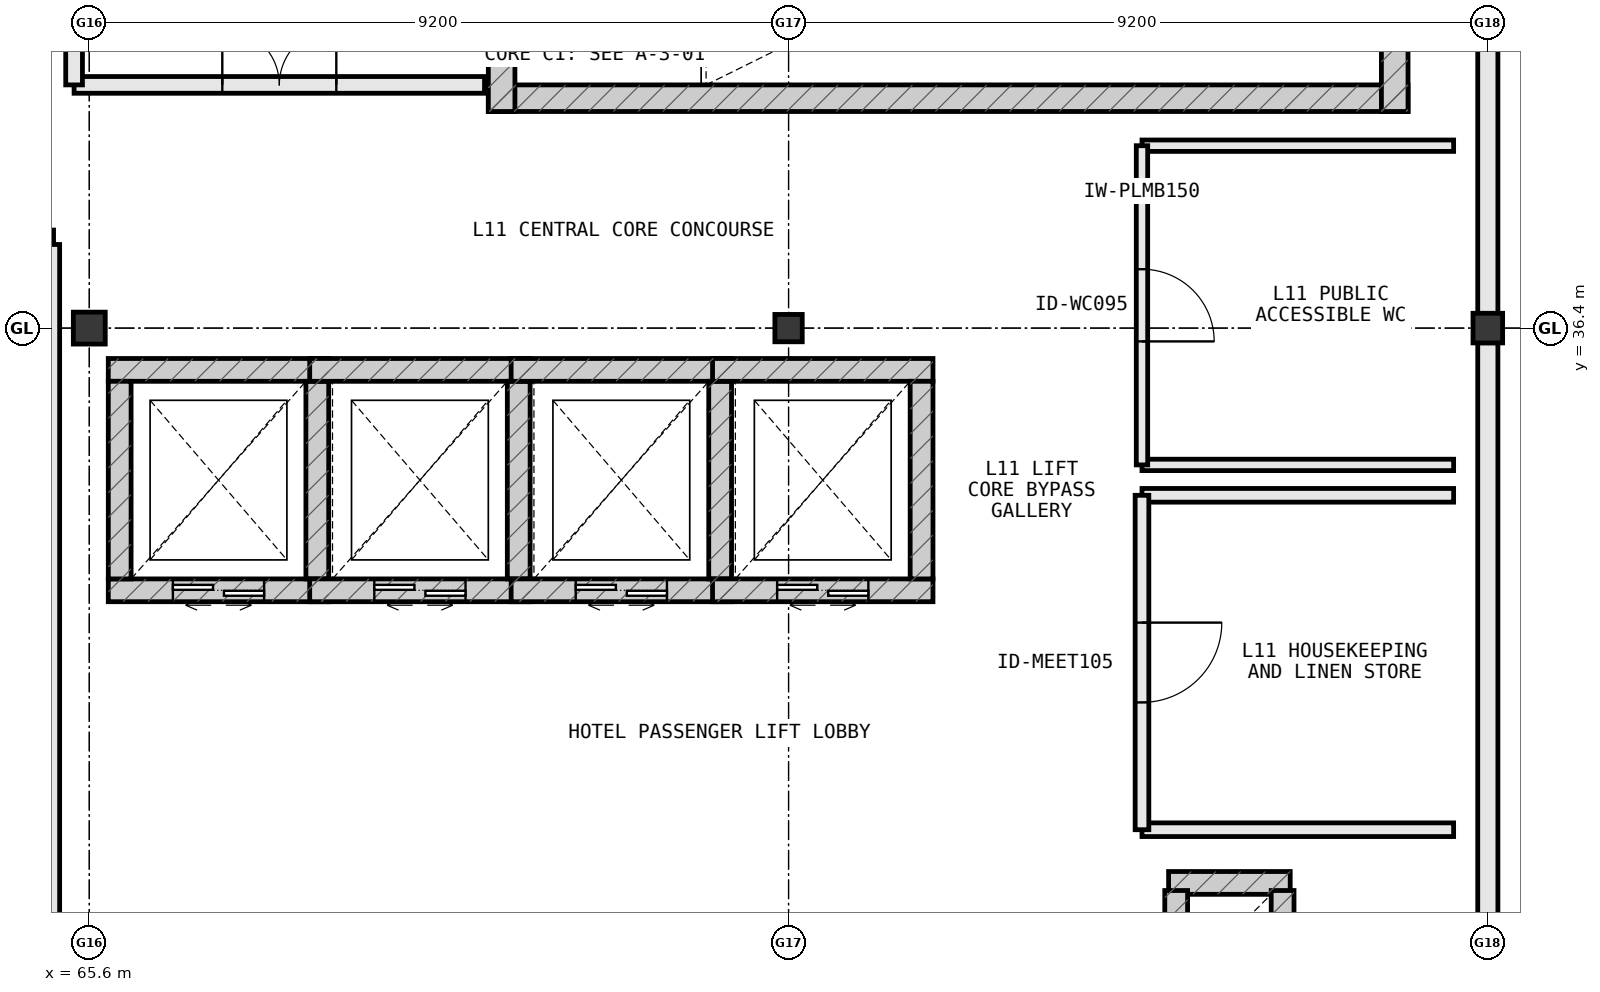
"""IFC4 building model, lengths in metres.
Left out: names, types, materials, properties, quantities, classifications, styles, units other than length and angle.
Written with IfcOpenShell. Run it as: python <this file> out.ifc"""

import sys

from ifc_helpers import new_model, si_unit, direction, frame, frame_2d, origin, origin_2d, place, context, subcontext, project, spatial, rectangle, extrude, element, fill, save


model = new_model("IFC4")
c1 = context("Model", 3, precision=1e-05, world=origin(), true_north=direction((0.0, 1.0)))
c2 = subcontext(c1, "Body", "Model", "MODEL_VIEW")
j1 = project(units=[si_unit("LENGTHUNIT", "METRE"), si_unit("PLANEANGLEUNIT", "RADIAN")], contexts=[c1])
p1 = place(None, origin())
s1 = spatial("IfcSite", under=j1, at=p1, CompositionType="ELEMENT")
p2 = place(p1, origin())
s2 = spatial("IfcBuilding", under=s1, at=p2, CompositionType="ELEMENT")
p3 = place(p2, frame((0.0, 0.0, 46.6)))
s3 = spatial("IfcBuildingStorey", under=s2, at=p3, CompositionType="ELEMENT", Elevation=46.6)
p4 = place(p3, frame((74.8, 36.4, 0.0), z_axis=(0.0, 0.0, 1.0), x_axis=(1.0, 0.0, 0.0)))
e1 = element("IfcColumn", 1, at=p4, inside=s3, PredefinedType="COLUMN", context=c2, shape_type="SweptSolid", body=[
    extrude(rectangle(XDim=0.36, YDim=0.36, at=origin_2d()), origin(), (0.0, 0.0, 1.0), 4.2),
])
p5 = place(p3, frame((84.0, 36.4, 0.0), z_axis=(0.0, 0.0, 1.0), x_axis=(1.0, 0.0, 0.0)))
e2 = element("IfcColumn", 2, at=p5, inside=s3, PredefinedType="COLUMN", context=c2, shape_type="SweptSolid", body=[
    extrude(rectangle(XDim=0.39, YDim=0.39, at=origin_2d()), origin(), (0.0, 0.0, 1.0), 4.2),
])
p6 = place(p3, frame((65.6, 36.4, 0.0), z_axis=(0.0, 0.0, 1.0), x_axis=(1.0, 0.0, 0.0)))
e3 = element("IfcColumn", 3, at=p6, inside=s3, PredefinedType="COLUMN", context=c2, shape_type="SweptSolid", body=[
    extrude(rectangle(XDim=0.42, YDim=0.42, at=origin_2d()), origin(), (0.0, 0.0, 1.0), 4.2),
])
p7 = place(p3, frame((81.4, 29.1, 0.0), z_axis=(0.0, 0.0, 1.0), x_axis=(-1.0, 0.0, 0.0)))
e4 = element("IfcWall", 4, at=p7, inside=s3, PredefinedType="SHEAR", context=c2, shape_type="SweptSolid", body=[
    extrude(rectangle(XDim=1.6, YDim=0.3, at=frame_2d((0.8, 0.0))), origin(), (0.0, 0.0, 1.0), 3.99),
])
for number, where, z_axis, x_axis in (
    (5, (79.9, 29.0, 0.0), (0.0, 0.0, 1.0), (0.0, -1.0, 0.0)),
    (6, (81.3, 27.8, 0.0), (0.0, 0.0, 1.0), (0.0, 1.0, 0.0)),
):
    element("IfcWall", number, at=place(p3, frame(where, z_axis=z_axis, x_axis=x_axis)), inside=s3, PredefinedType="SHEAR", context=c2, shape_type="SweptSolid", body=[
        extrude(rectangle(XDim=1.2, YDim=0.3, at=frame_2d((0.6, 0.0))), origin(), (0.0, 0.0, 1.0), 3.99),
    ])
p8 = place(p3, frame((84.0, 27.193, 0.0), z_axis=(0.0, 0.0, 1.0), x_axis=(0.0, 1.0, 0.0)))
e7 = element("IfcWall", 7, at=p8, inside=s3, PredefinedType="STANDARD", context=c2, shape_type="SweptSolid", body=[
    extrude(rectangle(XDim=9.014, YDim=0.265, at=frame_2d((4.507, 0.0))), origin(), (0.0, 0.0, 1.0), 3.99),
])
p9 = place(p3, frame((84.0, 36.593, 0.0), z_axis=(0.0, 0.0, 1.0), x_axis=(0.0, 1.0, 0.0)))
e8 = element("IfcWall", 8, at=p9, inside=s3, PredefinedType="STANDARD", context=c2, shape_type="SweptSolid", body=[
    extrude(rectangle(XDim=10.414, YDim=0.265, at=frame_2d((5.207, 0.0))), origin(), (0.0, 0.0, 1.0), 3.99),
])
p10 = place(p9, frame((7.135, 0.0, 0.85)))
e9 = element("IfcOpeningElement", 9, at=p10, cuts=e8, PredefinedType="OPENING", context=c2, shape_type="SweptSolid", body=[
    extrude(rectangle(XDim=1.35, YDim=1.65, at=frame_2d((0.675, 0.825))), frame((0.0, 0.145, 0.0), z_axis=(0.0, -1.0, 0.0), x_axis=(1.0, 0.0, 0.0)), (0.0, 0.0, 1.0), 0.289),
])
p11 = place(p3, frame((70.85, 39.425, 0.0), z_axis=(0.0, 0.0, 1.0), x_axis=(1.0, 0.0, 0.0)))
e10 = element("IfcWall", 10, at=p11, inside=s3, PredefinedType="SHEAR", context=c2, shape_type="SweptSolid", body=[
    extrude(rectangle(XDim=12.1, YDim=0.35, at=frame_2d((6.05, 0.0))), origin(), (0.0, 0.0, 1.0), 3.99),
])
p12 = place(p3, frame((82.775, 39.25, 0.0), z_axis=(0.0, 0.0, 1.0), x_axis=(0.0, 1.0, 0.0)))
e11 = element("IfcWall", 11, at=p12, inside=s3, PredefinedType="SHEAR", context=c2, shape_type="SweptSolid", body=[
    extrude(rectangle(XDim=5.1, YDim=0.35, at=frame_2d((2.55, 0.0))), origin(), (0.0, 0.0, 1.0), 3.99),
])
p13 = place(p3, frame((71.025, 44.35, 0.0), z_axis=(0.0, 0.0, 1.0), x_axis=(0.0, -1.0, 0.0)))
e12 = element("IfcWall", 12, at=p13, inside=s3, PredefinedType="SHEAR", context=c2, shape_type="SweptSolid", body=[
    extrude(rectangle(XDim=5.1, YDim=0.35, at=frame_2d((2.55, 0.0))), origin(), (0.0, 0.0, 1.0), 3.99),
])
p14 = place(p13, frame((2.0, 0.0, 0.0)))
e13 = element("IfcOpeningElement", 13, at=p14, cuts=e12, PredefinedType="OPENING", context=c2, shape_type="SweptSolid", body=[
    extrude(rectangle(XDim=1.1, YDim=2.2, at=frame_2d((0.55, 1.1))), frame((0.0, 0.187, 0.0), z_axis=(0.0, -1.0, 0.0), x_axis=(1.0, 0.0, 0.0)), (0.0, 0.0, 1.0), 0.374),
])
p15 = place(p3, frame((65.85, 32.95, 0.0), z_axis=(0.0, 0.0, 1.0), x_axis=(1.0, 0.0, 0.0)))
e14 = element("IfcWall", 14, at=p15, inside=s3, PredefinedType="SHEAR", context=c2, shape_type="SweptSolid", body=[
    extrude(rectangle(XDim=2.9, YDim=0.3, at=frame_2d((1.45, 0.0))), origin(), (0.0, 0.0, 1.0), 3.99),
])
p16 = place(p15, frame((0.85, 0.0, 0.0)))
e15 = element("IfcOpeningElement", 15, at=p16, cuts=e14, PredefinedType="OPENING", context=c2, shape_type="SweptSolid", body=[
    extrude(rectangle(XDim=1.2, YDim=2.2, at=frame_2d((0.6, 1.1))), frame((0.0, 0.162, 0.0), z_axis=(0.0, -1.0, 0.0), x_axis=(1.0, 0.0, 0.0)), (0.0, 0.0, 1.0), 0.324),
])
p17 = place(p3, frame((68.75, 35.85, 0.0), z_axis=(0.0, 0.0, 1.0), x_axis=(-1.0, 0.0, 0.0)))
e16 = element("IfcWall", 16, at=p17, inside=s3, PredefinedType="SHEAR", context=c2, shape_type="SweptSolid", body=[
    extrude(rectangle(XDim=2.9, YDim=0.3, at=frame_2d((1.45, 0.0))), origin(), (0.0, 0.0, 1.0), 3.99),
])
for number, where, z_axis, x_axis in (
    (17, (68.6, 33.1, 0.0), (0.0, 0.0, 1.0), (0.0, 1.0, 0.0)),
    (18, (66.0, 35.7, 0.0), (0.0, 0.0, 1.0), (0.0, -1.0, 0.0)),
):
    element("IfcWall", number, at=place(p3, frame(where, z_axis=z_axis, x_axis=x_axis)), inside=s3, PredefinedType="SHEAR", context=c2, shape_type="SweptSolid", body=[
        extrude(rectangle(XDim=2.6, YDim=0.3, at=frame_2d((1.3, 0.0))), origin(), (0.0, 0.0, 1.0), 3.99),
    ])
p18 = place(p3, frame((68.5, 32.95, 0.0), z_axis=(0.0, 0.0, 1.0), x_axis=(1.0, 0.0, 0.0)))
e19 = element("IfcWall", 19, at=p18, inside=s3, PredefinedType="SHEAR", context=c2, shape_type="SweptSolid", body=[
    extrude(rectangle(XDim=2.9, YDim=0.3, at=frame_2d((1.45, 0.0))), origin(), (0.0, 0.0, 1.0), 3.99),
])
p19 = place(p18, frame((0.85, 0.0, 0.0)))
e20 = element("IfcOpeningElement", 20, at=p19, cuts=e19, PredefinedType="OPENING", context=c2, shape_type="SweptSolid", body=[
    extrude(rectangle(XDim=1.2, YDim=2.2, at=frame_2d((0.6, 1.1))), frame((0.0, 0.162, 0.0), z_axis=(0.0, -1.0, 0.0), x_axis=(1.0, 0.0, 0.0)), (0.0, 0.0, 1.0), 0.324),
])
p20 = place(p3, frame((71.4, 35.85, 0.0), z_axis=(0.0, 0.0, 1.0), x_axis=(-1.0, 0.0, 0.0)))
e21 = element("IfcWall", 21, at=p20, inside=s3, PredefinedType="SHEAR", context=c2, shape_type="SweptSolid", body=[
    extrude(rectangle(XDim=2.9, YDim=0.3, at=frame_2d((1.45, 0.0))), origin(), (0.0, 0.0, 1.0), 3.99),
])
p21 = place(p3, frame((71.25, 33.1, 0.0), z_axis=(0.0, 0.0, 1.0), x_axis=(0.0, 1.0, 0.0)))
e22 = element("IfcWall", 22, at=p21, inside=s3, PredefinedType="SHEAR", context=c2, shape_type="SweptSolid", body=[
    extrude(rectangle(XDim=2.6, YDim=0.3, at=frame_2d((1.3, 0.0))), origin(), (0.0, 0.0, 1.0), 3.99),
])
p22 = place(p3, frame((71.15, 32.95, 0.0), z_axis=(0.0, 0.0, 1.0), x_axis=(1.0, 0.0, 0.0)))
e23 = element("IfcWall", 23, at=p22, inside=s3, PredefinedType="SHEAR", context=c2, shape_type="SweptSolid", body=[
    extrude(rectangle(XDim=2.9, YDim=0.3, at=frame_2d((1.45, 0.0))), origin(), (0.0, 0.0, 1.0), 3.99),
])
p23 = place(p22, frame((0.85, 0.0, 0.0)))
e24 = element("IfcOpeningElement", 24, at=p23, cuts=e23, PredefinedType="OPENING", context=c2, shape_type="SweptSolid", body=[
    extrude(rectangle(XDim=1.2, YDim=2.2, at=frame_2d((0.6, 1.1))), frame((0.0, 0.162, 0.0), z_axis=(0.0, -1.0, 0.0), x_axis=(1.0, 0.0, 0.0)), (0.0, 0.0, 1.0), 0.324),
])
p24 = place(p3, frame((74.05, 35.85, 0.0), z_axis=(0.0, 0.0, 1.0), x_axis=(-1.0, 0.0, 0.0)))
e25 = element("IfcWall", 25, at=p24, inside=s3, PredefinedType="SHEAR", context=c2, shape_type="SweptSolid", body=[
    extrude(rectangle(XDim=2.9, YDim=0.3, at=frame_2d((1.45, 0.0))), origin(), (0.0, 0.0, 1.0), 3.99),
])
p25 = place(p3, frame((73.9, 33.1, 0.0), z_axis=(0.0, 0.0, 1.0), x_axis=(0.0, 1.0, 0.0)))
e26 = element("IfcWall", 26, at=p25, inside=s3, PredefinedType="SHEAR", context=c2, shape_type="SweptSolid", body=[
    extrude(rectangle(XDim=2.6, YDim=0.3, at=frame_2d((1.3, 0.0))), origin(), (0.0, 0.0, 1.0), 3.99),
])
p26 = place(p3, frame((73.8, 32.95, 0.0), z_axis=(0.0, 0.0, 1.0), x_axis=(1.0, 0.0, 0.0)))
e27 = element("IfcWall", 27, at=p26, inside=s3, PredefinedType="SHEAR", context=c2, shape_type="SweptSolid", body=[
    extrude(rectangle(XDim=2.9, YDim=0.3, at=frame_2d((1.45, 0.0))), origin(), (0.0, 0.0, 1.0), 3.99),
])
p27 = place(p26, frame((0.85, 0.0, 0.0)))
e28 = element("IfcOpeningElement", 28, at=p27, cuts=e27, PredefinedType="OPENING", context=c2, shape_type="SweptSolid", body=[
    extrude(rectangle(XDim=1.2, YDim=2.2, at=frame_2d((0.6, 1.1))), frame((0.0, 0.162, 0.0), z_axis=(0.0, -1.0, 0.0), x_axis=(1.0, 0.0, 0.0)), (0.0, 0.0, 1.0), 0.324),
])
p28 = place(p3, frame((76.7, 35.85, 0.0), z_axis=(0.0, 0.0, 1.0), x_axis=(-1.0, 0.0, 0.0)))
e29 = element("IfcWall", 29, at=p28, inside=s3, PredefinedType="SHEAR", context=c2, shape_type="SweptSolid", body=[
    extrude(rectangle(XDim=2.9, YDim=0.3, at=frame_2d((1.45, 0.0))), origin(), (0.0, 0.0, 1.0), 3.99),
])
p29 = place(p3, frame((76.55, 33.1, 0.0), z_axis=(0.0, 0.0, 1.0), x_axis=(0.0, 1.0, 0.0)))
e30 = element("IfcWall", 30, at=p29, inside=s3, PredefinedType="SHEAR", context=c2, shape_type="SweptSolid", body=[
    extrude(rectangle(XDim=2.6, YDim=0.3, at=frame_2d((1.3, 0.0))), origin(), (0.0, 0.0, 1.0), 3.99),
])
p30 = place(p3, frame((65.4, 39.6, 0.0), z_axis=(0.0, 0.0, 1.0), x_axis=(1.0, 0.0, 0.0)))
e31 = element("IfcWall", 31, at=p30, inside=s3, PredefinedType="STANDARD", context=c2, shape_type="SweptSolid", body=[
    extrude(rectangle(XDim=5.4, YDim=0.22, at=frame_2d((2.7, 0.0))), origin(), (0.0, 0.0, 1.0), 3.99),
])
p31 = place(p30, frame((1.95, 0.0, 0.0)))
e32 = element("IfcOpeningElement", 32, at=p31, cuts=e31, PredefinedType="OPENING", context=c2, shape_type="SweptSolid", body=[
    extrude(rectangle(XDim=1.5, YDim=2.2, at=frame_2d((0.75, 1.1))), frame((0.0, 0.122, 0.0), z_axis=(0.0, -1.0, 0.0), x_axis=(1.0, 0.0, 0.0)), (0.0, 0.0, 1.0), 0.244),
])
p32 = place(p3, frame((65.4, 43.85, 0.0), z_axis=(0.0, 0.0, 1.0), x_axis=(0.0, -1.0, 0.0)))
e33 = element("IfcWall", 33, at=p32, inside=s3, PredefinedType="STANDARD", context=c2, shape_type="SweptSolid", body=[
    extrude(rectangle(XDim=4.25, YDim=0.22, at=frame_2d((2.125, 0.0))), origin(), (0.0, 0.0, 1.0), 3.99),
])
p33 = place(p32, frame((1.375, 0.0, 0.0)))
e34 = element("IfcOpeningElement", 34, at=p33, cuts=e33, PredefinedType="OPENING", context=c2, shape_type="SweptSolid", body=[
    extrude(rectangle(XDim=1.5, YDim=2.2, at=frame_2d((0.75, 1.1))), frame((0.0, 0.122, 0.0), z_axis=(0.0, -1.0, 0.0), x_axis=(1.0, 0.0, 0.0)), (0.0, 0.0, 1.0), 0.244),
])
for number, where, z_axis, x_axis in (
    (35, (79.45, 29.8, 0.0), (0.0, 0.0, 1.0), (1.0, 0.0, 0.0)),
    (36, (83.55, 34.2, 0.0), (0.0, 0.0, 1.0), (-1.0, 0.0, 0.0)),
):
    element("IfcWall", number, at=place(p3, frame(where, z_axis=z_axis, x_axis=x_axis)), inside=s3, PredefinedType="PARTITIONING", context=c2, shape_type="SweptSolid", body=[
        extrude(rectangle(XDim=4.1, YDim=0.18, at=frame_2d((2.05, 0.0))), origin(), (0.0, 0.0, 1.0), 3.99),
    ])
p34 = place(p3, frame((79.45, 34.2, 0.0), z_axis=(0.0, 0.0, 1.0), x_axis=(0.0, -1.0, 0.0)))
e37 = element("IfcWall", 37, at=p34, inside=s3, PredefinedType="PARTITIONING", context=c2, shape_type="SweptSolid", body=[
    extrude(rectangle(XDim=4.4, YDim=0.18, at=frame_2d((2.2, 0.0))), origin(), (0.0, 0.0, 1.0), 3.99),
])
p35 = place(p34, frame((1.675, 0.0, 0.0)))
e38 = element("IfcOpeningElement", 38, at=p35, cuts=e37, PredefinedType="OPENING", context=c2, shape_type="SweptSolid", body=[
    extrude(rectangle(XDim=1.05, YDim=2.2, at=frame_2d((0.525, 1.1))), frame((0.0, 0.102, 0.0), z_axis=(0.0, -1.0, 0.0), x_axis=(1.0, 0.0, 0.0)), (0.0, 0.0, 1.0), 0.204),
])
for number, where, z_axis, x_axis in (
    (39, (79.45, 34.6, 0.0), (0.0, 0.0, 1.0), (1.0, 0.0, 0.0)),
    (40, (83.55, 38.8, 0.0), (0.0, 0.0, 1.0), (-1.0, 0.0, 0.0)),
):
    element("IfcWall", number, at=place(p3, frame(where, z_axis=z_axis, x_axis=x_axis)), inside=s3, PredefinedType="PLUMBINGWALL", context=c2, shape_type="SweptSolid", body=[
        extrude(rectangle(XDim=4.1, YDim=0.15, at=frame_2d((2.05, 0.0))), origin(), (0.0, 0.0, 1.0), 3.99),
    ])
p36 = place(p3, frame((79.45, 38.8, 0.0), z_axis=(0.0, 0.0, 1.0), x_axis=(0.0, -1.0, 0.0)))
e41 = element("IfcWall", 41, at=p36, inside=s3, PredefinedType="PLUMBINGWALL", context=c2, shape_type="SweptSolid", body=[
    extrude(rectangle(XDim=4.2, YDim=0.15, at=frame_2d((2.1, 0.0))), origin(), (0.0, 0.0, 1.0), 3.99),
])
p37 = place(p36, frame((1.625, 0.0, 0.0)))
e42 = element("IfcOpeningElement", 42, at=p37, cuts=e41, PredefinedType="OPENING", context=c2, shape_type="SweptSolid", body=[
    extrude(rectangle(XDim=0.95, YDim=2.15, at=frame_2d((0.475, 1.075))), frame((0.0, 0.087, 0.0), z_axis=(0.0, -1.0, 0.0), x_axis=(1.0, 0.0, 0.0)), (0.0, 0.0, 1.0), 0.174),
])
p38 = place(p3, frame((65.13, 37.6, 0.0), z_axis=(0.0, 0.0, 1.0), x_axis=(-1.0, 0.0, 0.0)))
e43 = element("IfcWall", 43, at=p38, inside=s3, PredefinedType="PARTITIONING", context=c2, shape_type="SweptSolid", body=[
    extrude(rectangle(XDim=6.38, YDim=0.18, at=frame_2d((3.19, 0.0))), origin(), (0.0, 0.0, 1.0), 3.99),
])
p39 = place(p38, frame((1.72, 0.0, 0.0)))
e44 = element("IfcOpeningElement", 44, at=p39, cuts=e43, PredefinedType="OPENING", context=c2, shape_type="SweptSolid", body=[
    extrude(rectangle(XDim=0.98, YDim=2.18, at=frame_2d((0.49, 1.09))), frame((0.0, 0.102, 0.0), z_axis=(0.0, -1.0, 0.0), x_axis=(1.0, 0.0, 0.0)), (0.0, 0.0, 1.0), 0.204),
])
p40 = place(p3, frame((65.13, 27.16, 0.0), z_axis=(0.0, 0.0, 1.0), x_axis=(0.0, 1.0, 0.0)))
e45 = element("IfcWall", 45, at=p40, inside=s3, PredefinedType="PARTITIONING", context=c2, shape_type="SweptSolid", body=[
    extrude(rectangle(XDim=10.34, YDim=0.16, at=frame_2d((5.17, 0.0))), origin(), (0.0, 0.0, 1.0), 3.99),
])
p41 = place(p16, origin())
e46 = element("IfcDoor", 46, at=p41, inside=s3, OperationType="DOUBLE_DOOR_SLIDING", PredefinedType="DOOR", context=c2, shape_type="SweptSolid", body=[
    extrude(rectangle(XDim=1.2, YDim=2.2, at=frame_2d((0.6, 1.1))), frame((0.0, 0.025, 0.0), z_axis=(0.0, -1.0, 0.0), x_axis=(1.0, 0.0, 0.0)), (0.0, 0.0, 1.0), 0.05),
])
fill(e15, e46)
p42 = place(p19, origin())
e47 = element("IfcDoor", 47, at=p42, inside=s3, OperationType="DOUBLE_DOOR_SLIDING", PredefinedType="DOOR", context=c2, shape_type="SweptSolid", body=[
    extrude(rectangle(XDim=1.2, YDim=2.2, at=frame_2d((0.6, 1.1))), frame((0.0, 0.025, 0.0), z_axis=(0.0, -1.0, 0.0), x_axis=(1.0, 0.0, 0.0)), (0.0, 0.0, 1.0), 0.05),
])
fill(e20, e47)
p43 = place(p23, origin())
e48 = element("IfcDoor", 48, at=p43, inside=s3, OperationType="DOUBLE_DOOR_SLIDING", PredefinedType="DOOR", context=c2, shape_type="SweptSolid", body=[
    extrude(rectangle(XDim=1.2, YDim=2.2, at=frame_2d((0.6, 1.1))), frame((0.0, 0.025, 0.0), z_axis=(0.0, -1.0, 0.0), x_axis=(1.0, 0.0, 0.0)), (0.0, 0.0, 1.0), 0.05),
])
fill(e24, e48)
p44 = place(p27, origin())
e49 = element("IfcDoor", 49, at=p44, inside=s3, OperationType="DOUBLE_DOOR_SLIDING", PredefinedType="DOOR", context=c2, shape_type="SweptSolid", body=[
    extrude(rectangle(XDim=1.2, YDim=2.2, at=frame_2d((0.6, 1.1))), frame((0.0, 0.025, 0.0), z_axis=(0.0, -1.0, 0.0), x_axis=(1.0, 0.0, 0.0)), (0.0, 0.0, 1.0), 0.05),
])
fill(e28, e49)
p45 = place(p31, origin())
e50 = element("IfcDoor", 50, at=p45, inside=s3, OperationType="DOUBLE_DOOR_SINGLE_SWING", PredefinedType="DOOR", context=c2, shape_type="SweptSolid", body=[
    extrude(rectangle(XDim=1.5, YDim=2.2, at=frame_2d((0.75, 1.1))), frame((0.0, 0.025, 0.0), z_axis=(0.0, -1.0, 0.0), x_axis=(1.0, 0.0, 0.0)), (0.0, 0.0, 1.0), 0.05),
])
fill(e32, e50)
p46 = place(p35, origin())
e51 = element("IfcDoor", 51, at=p46, inside=s3, OperationType="SINGLE_SWING_LEFT", PredefinedType="DOOR", context=c2, shape_type="SweptSolid", body=[
    extrude(rectangle(XDim=1.05, YDim=2.2, at=frame_2d((0.525, 1.1))), frame((0.0, 0.025, 0.0), z_axis=(0.0, -1.0, 0.0), x_axis=(1.0, 0.0, 0.0)), (0.0, 0.0, 1.0), 0.05),
])
fill(e38, e51)
p47 = place(p37, origin())
e52 = element("IfcDoor", 52, at=p47, inside=s3, OperationType="SINGLE_SWING_RIGHT", PredefinedType="DOOR", context=c2, shape_type="SweptSolid", body=[
    extrude(rectangle(XDim=0.95, YDim=2.15, at=frame_2d((0.475, 1.075))), frame((0.0, 0.025, 0.0), z_axis=(0.0, -1.0, 0.0), x_axis=(1.0, 0.0, 0.0)), (0.0, 0.0, 1.0), 0.05),
])
fill(e42, e52)
save(model, sys.argv[1])
